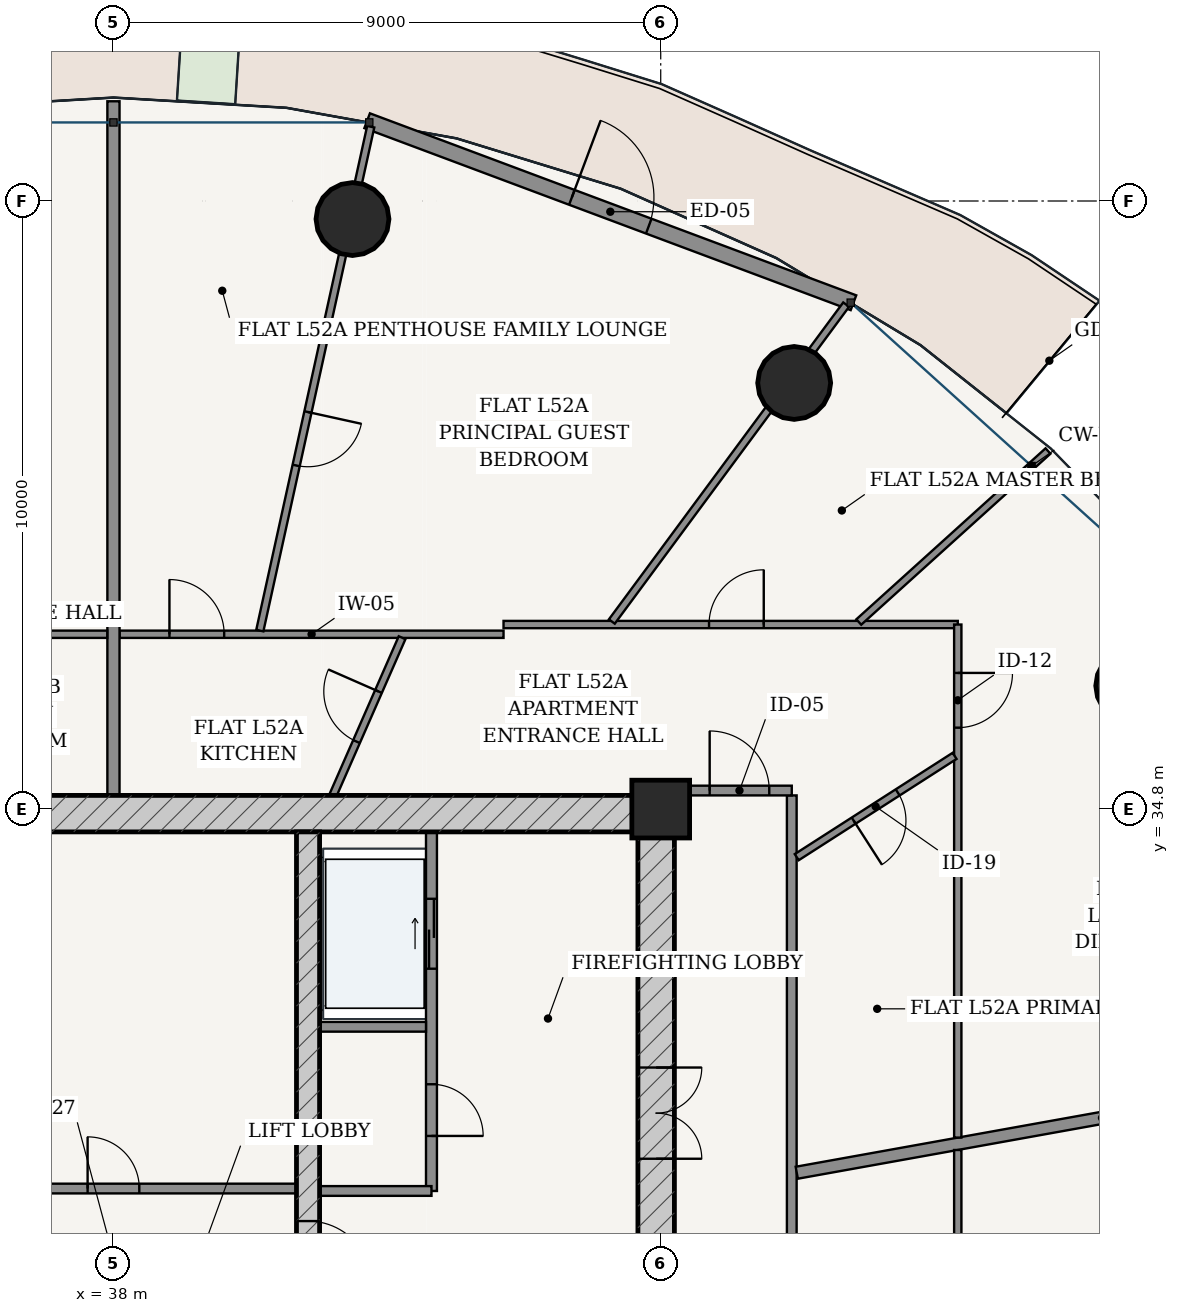
"""IFC4 building model, lengths in metres.
Left out: names, types, materials, properties, quantities, classifications, styles, units other than length and angle.
Written with IfcOpenShell. Run it as: python <this file> out.ifc"""

import sys

from ifc_helpers import new_model, si_unit, direction, frame, frame_2d, origin, origin_2d, place, context, subcontext, project, spatial, rectangle, hollow_circle, extrude, source, transform, mapped, element, fill, save


model = new_model("IFC4")
c1 = context("Model", 3, precision=1e-05, world=origin(), true_north=direction((-0.2419218956, 0.970295726276)))
c2 = subcontext(c1, "Body", "Model", "MODEL_VIEW")
j1 = project(units=[si_unit("LENGTHUNIT", "METRE"), si_unit("PLANEANGLEUNIT", "RADIAN")], contexts=[c1])
p1 = place(None, origin())
s1 = spatial("IfcSite", under=j1, at=p1, CompositionType="ELEMENT")
p2 = place(p1, origin())
s2 = spatial("IfcBuilding", under=s1, at=p2, CompositionType="ELEMENT")
p3 = place(p2, frame((0.0, 0.0, 198.6)))
s3 = spatial("IfcBuildingStorey", under=s2, at=p3, CompositionType="ELEMENT", Elevation=198.6)
p4 = place(p3, frame((47.0, 34.8, 0.0), z_axis=(0.0, 0.0, 1.0), x_axis=(1.0, 0.0, 0.0)))
e1 = element("IfcColumn", 1, at=p4, inside=s3, PredefinedType="COLUMN", context=c2, shape_type="SweptSolid", body=[
    extrude(rectangle(XDim=0.95, YDim=0.95, at=origin_2d()), origin(), (0.0, 0.0, 1.0), 3.7),
])
p5 = place(p3, frame((28.775, 34.725, 0.0), z_axis=(0.0, 0.0, 1.0), x_axis=(1.0, 0.0, 0.0)))
e2 = element("IfcWall", 2, at=p5, inside=s3, PredefinedType="SHEAR", context=c2, shape_type="SweptSolid", body=[
    extrude(rectangle(XDim=18.45, YDim=0.6, at=frame_2d((9.225, 0.0))), origin(), (0.0, 0.0, 1.0), 3.435),
])
p6 = place(p3, frame((46.925, 19.175, 0.0), z_axis=(0.0, 0.0, 1.0), x_axis=(0.0, 1.0, 0.0)))
e3 = element("IfcWall", 3, at=p6, inside=s3, PredefinedType="SHEAR", context=c2, shape_type="SweptSolid", body=[
    extrude(rectangle(XDim=15.25, YDim=0.6, at=frame_2d((7.625, 0.0))), origin(), (0.0, 0.0, 1.0), 3.435),
])
p7 = place(p6, frame((9.875, 0.0, 0.0)))
e4 = element("IfcOpeningElement", 4, at=p7, cuts=e3, PredefinedType="OPENING", context=c2, shape_type="SweptSolid", body=[
    extrude(rectangle(XDim=1.5, YDim=2.2, at=frame_2d((0.75, 1.1))), frame((0.0, 0.31, 0.0), z_axis=(0.0, -1.0, 0.0), x_axis=(1.0, 0.0, 0.0)), (0.0, 0.0, 1.0), 0.62),
])
p8 = place(p3, frame((41.2, 19.175, 0.0), z_axis=(0.0, 0.0, 1.0), x_axis=(0.0, 1.0, 0.0)))
e5 = element("IfcWall", 5, at=p8, inside=s3, PredefinedType="SHEAR", context=c2, shape_type="SweptSolid", body=[
    extrude(rectangle(XDim=15.25, YDim=0.38, at=frame_2d((7.625, 0.0))), origin(), (0.0, 0.0, 1.0), 3.435),
])
p9 = place(p8, frame((7.8, 0.0, 0.0)))
e6 = element("IfcOpeningElement", 6, at=p9, cuts=e5, PredefinedType="OPENING", context=c2, shape_type="SweptSolid", body=[
    extrude(rectangle(XDim=1.05, YDim=2.15, at=frame_2d((0.525, 1.075))), frame((0.0, 0.2, 0.0), z_axis=(0.0, -1.0, 0.0), x_axis=(1.0, 0.0, 0.0)), (0.0, 0.0, 1.0), 0.4),
])
for number, where, z_axis, x_axis in (
    (7, (54.754, 36.828, 0.0), (0.0, 0.0, 1.0), (1.0, 0.0, 0.0)),
    (8, (49.195, 41.808, 0.0), (0.0, 0.0, 1.0), (1.0, 0.0, 0.0)),
    (9, (41.931, 44.503, 0.0), (0.0, 0.0, 1.0), (1.0, 0.0, 0.0)),
):
    element("IfcColumn", number, at=place(p3, frame(where, z_axis=z_axis, x_axis=x_axis)), inside=s3, PredefinedType="COLUMN", context=c2, shape_type="SweptSolid", body=[
        extrude(hollow_circle(Radius=0.6, WallThickness=0.038, at=origin_2d()), origin(), (0.0, 0.0, 1.0), 3.7),
    ])
p10 = place(p3, frame((50.17, 43.127, 0.0), z_axis=(0.0, 0.0, 1.0), x_axis=(-0.936556918375, 0.350515532672, 0.0)))
e10 = element("IfcWall", 10, at=p10, inside=s3, PredefinedType="SOLIDWALL", context=c2, shape_type="SweptSolid", body=[
    extrude(rectangle(XDim=8.539, YDim=0.26, at=frame_2d((4.27, 0.0))), origin(), (0.0, 0.0, 1.0), 3.435),
])
p11 = place(p10, frame((3.594, 0.0, 0.0)))
e11 = element("IfcOpeningElement", 11, at=p11, cuts=e10, PredefinedType="OPENING", context=c2, shape_type="SweptSolid", body=[
    extrude(rectangle(XDim=1.35, YDim=2.2, at=frame_2d((0.675, 1.1))), frame((0.0, 0.14, 0.0), z_axis=(0.0, -1.0, 0.0), x_axis=(1.0, 0.0, 0.0)), (0.0, 0.0, 1.0), 0.28),
])
p12 = place(p3, frame((43.23, 28.52, 0.0), z_axis=(0.0, 0.0, 1.0), x_axis=(0.0, 1.0, 0.0)))
e12 = element("IfcWall", 12, at=p12, inside=s3, PredefinedType="PARTITIONING", context=c2, shape_type="SweptSolid", body=[
    extrude(rectangle(XDim=5.905, YDim=0.18, at=frame_2d((2.953, 0.0))), origin(), (0.0, 0.0, 1.0), 3.435),
])
p13 = place(p12, frame((0.905, 0.0, 0.0)))
e13 = element("IfcOpeningElement", 13, at=p13, cuts=e12, PredefinedType="OPENING", context=c2, shape_type="SweptSolid", body=[
    extrude(rectangle(XDim=0.85, YDim=2.1, at=frame_2d((0.425, 1.05))), frame((0.0, 0.1, 0.0), z_axis=(0.0, -1.0, 0.0), x_axis=(1.0, 0.0, 0.0)), (0.0, 0.0, 1.0), 0.2),
])
p14 = place(p12, frame((3.655, 0.0, 0.0)))
e14 = element("IfcOpeningElement", 14, at=p14, cuts=e12, PredefinedType="OPENING", context=c2, shape_type="SweptSolid", body=[
    extrude(rectangle(XDim=1.15, YDim=2.2, at=frame_2d((0.575, 1.1))), frame((0.0, 0.1, 0.0), z_axis=(0.0, -1.0, 0.0), x_axis=(1.0, 0.0, 0.0)), (0.0, 0.0, 1.0), 0.2),
])
p15 = place(p3, frame((41.39, 31.22, 0.0), z_axis=(0.0, 0.0, 1.0), x_axis=(1.0, 0.0, 0.0)))
e15 = element("IfcWall", 15, at=p15, inside=s3, PredefinedType="PARTITIONING", context=c2, shape_type="SweptSolid", body=[
    extrude(rectangle(XDim=1.75, YDim=0.16, at=frame_2d((0.875, 0.0))), origin(), (0.0, 0.0, 1.0), 3.435),
])
p16 = place(p3, frame((41.39, 28.52, 0.0), z_axis=(0.0, 0.0, 1.0), x_axis=(1.0, 0.0, 0.0)))
e16 = element("IfcWall", 16, at=p16, inside=s3, PredefinedType="PARTITIONING", context=c2, shape_type="SweptSolid", body=[
    extrude(rectangle(XDim=1.84, YDim=0.16, at=frame_2d((0.92, 0.0))), origin(), (0.0, 0.0, 1.0), 3.435),
])
p17 = place(p3, frame((34.99, 28.56, 0.0), z_axis=(0.0, 0.0, 1.0), x_axis=(1.0, 0.0, 0.0)))
e17 = element("IfcWall", 17, at=p17, inside=s3, PredefinedType="PARTITIONING", context=c2, shape_type="SweptSolid", body=[
    extrude(rectangle(XDim=6.02, YDim=0.16, at=frame_2d((3.01, 0.0))), origin(), (0.0, 0.0, 1.0), 3.435),
])
p18 = place(p17, frame((2.585, 0.0, 0.0)))
e18 = element("IfcOpeningElement", 18, at=p18, cuts=e17, PredefinedType="OPENING", context=c2, shape_type="SweptSolid", body=[
    extrude(rectangle(XDim=0.85, YDim=2.1, at=frame_2d((0.425, 1.05))), frame((0.0, 0.09, 0.0), z_axis=(0.0, -1.0, 0.0), x_axis=(1.0, 0.0, 0.0)), (0.0, 0.0, 1.0), 0.18),
])
p19 = place(p3, frame((49.155, 16.725, 0.0), z_axis=(0.0, 0.0, 1.0), x_axis=(0.0, 1.0, 0.0)))
e19 = element("IfcWall", 19, at=p19, inside=s3, PredefinedType="PARTITIONING", context=c2, shape_type="SweptSolid", body=[
    extrude(rectangle(XDim=18.3, YDim=0.16, at=frame_2d((9.15, 0.0))), origin(), (0.0, 0.0, 1.0), 2.951),
])
p20 = place(p3, frame((47.225, 35.105, 0.0), z_axis=(0.0, 0.0, 1.0), x_axis=(1.0, 0.0, 0.0)))
e20 = element("IfcWall", 20, at=p20, inside=s3, PredefinedType="PARTITIONING", context=c2, shape_type="SweptSolid", body=[
    extrude(rectangle(XDim=1.93, YDim=0.16, at=frame_2d((0.965, 0.0))), origin(), (0.0, 0.0, 1.0), 3.435),
])
p21 = place(p20, frame((0.58, 0.0, 0.0)))
e21 = element("IfcOpeningElement", 21, at=p21, cuts=e20, PredefinedType="OPENING", context=c2, shape_type="SweptSolid", body=[
    extrude(rectangle(XDim=0.98, YDim=2.2, at=frame_2d((0.49, 1.1))), frame((0.0, 0.09, 0.0), z_axis=(0.0, -1.0, 0.0), x_axis=(1.0, 0.0, 0.0)), (0.0, 0.0, 1.0), 0.18),
])
p22 = place(p3, frame((49.237, 28.82, 0.0), z_axis=(0.0, 0.0, 1.0), x_axis=(0.984224859606, 0.176922089446, 0.0)))
e22 = element("IfcWall", 22, at=p22, inside=s3, PredefinedType="PARTITIONING", context=c2, shape_type="SweptSolid", body=[
    extrude(rectangle(XDim=10.2, YDim=0.2, at=frame_2d((5.1, 0.0))), origin(), (0.0, 0.0, 1.0), 2.951),
])
p23 = place(p3, frame((38.102, 37.675, 0.0), z_axis=(0.0, 0.0, 1.0), x_axis=(1.0, 0.0, 0.0)))
e23 = element("IfcWall", 23, at=p23, inside=s3, PredefinedType="PARTITIONING", context=c2, shape_type="SweptSolid", body=[
    extrude(rectangle(XDim=6.313, YDim=0.12, at=frame_2d((3.156, 0.0))), origin(), (0.0, 0.0, 1.0), 2.951),
])
p24 = place(p23, frame((0.819, 0.0, 0.0)))
e24 = element("IfcOpeningElement", 24, at=p24, cuts=e23, PredefinedType="OPENING", context=c2, shape_type="SweptSolid", body=[
    extrude(rectangle(XDim=0.9, YDim=2.15, at=frame_2d((0.45, 1.075))), frame((0.0, 0.07, 0.0), z_axis=(0.0, -1.0, 0.0), x_axis=(1.0, 0.0, 0.0)), (0.0, 0.0, 1.0), 0.14),
])
p25 = place(p3, frame((44.415, 37.835, 0.0), z_axis=(0.0, 0.0, 1.0), x_axis=(1.0, 0.0, 0.0)))
e25 = element("IfcWall", 25, at=p25, inside=s3, PredefinedType="PARTITIONING", context=c2, shape_type="SweptSolid", body=[
    extrude(rectangle(XDim=7.47, YDim=0.12, at=frame_2d((3.735, 0.0))), origin(), (0.0, 0.0, 1.0), 2.951),
])
p26 = place(p25, frame((3.379, 0.0, 0.0)))
e26 = element("IfcOpeningElement", 26, at=p26, cuts=e25, PredefinedType="OPENING", context=c2, shape_type="SweptSolid", body=[
    extrude(rectangle(XDim=0.9, YDim=2.15, at=frame_2d((0.45, 1.075))), frame((0.0, 0.07, 0.0), z_axis=(0.0, -1.0, 0.0), x_axis=(1.0, 0.0, 0.0)), (0.0, 0.0, 1.0), 0.14),
])
p27 = place(p3, frame((51.885, 37.835, 0.0), z_axis=(0.0, 0.0, 1.0), x_axis=(0.0, -1.0, 0.0)))
e27 = element("IfcWall", 27, at=p27, inside=s3, PredefinedType="PARTITIONING", context=c2, shape_type="SweptSolid", body=[
    extrude(rectangle(XDim=8.437, YDim=0.12, at=frame_2d((4.219, 0.0))), origin(), (0.0, 0.0, 1.0), 2.951),
])
p28 = place(p27, frame((0.796, 0.0, 0.0)))
e28 = element("IfcOpeningElement", 28, at=p28, cuts=e27, PredefinedType="OPENING", context=c2, shape_type="SweptSolid", body=[
    extrude(rectangle(XDim=0.9, YDim=2.15, at=frame_2d((0.45, 1.075))), frame((0.0, 0.07, 0.0), z_axis=(0.0, -1.0, 0.0), x_axis=(1.0, 0.0, 0.0)), (0.0, 0.0, 1.0), 0.14),
])
p29 = place(p3, frame((50.257, 37.876, 0.0), z_axis=(0.0, 0.0, 1.0), x_axis=(0.741943837234, 0.670462036502, 0.0)))
e29 = element("IfcWall", 29, at=p29, inside=s3, PredefinedType="PARTITIONING", context=c2, shape_type="SweptSolid", body=[
    extrude(rectangle(XDim=4.194, YDim=0.12, at=frame_2d((2.097, 0.0))), origin(), (0.0, 0.0, 1.0), 2.951),
])
p30 = place(p3, frame((46.196, 37.885, 0.0), z_axis=(0.0, 0.0, 1.0), x_axis=(0.594507557292, 0.804090022524, 0.0)))
e30 = element("IfcWall", 30, at=p30, inside=s3, PredefinedType="PARTITIONING", context=c2, shape_type="SweptSolid", body=[
    extrude(rectangle(XDim=6.481, YDim=0.12, at=frame_2d((3.241, 0.0))), origin(), (0.0, 0.0, 1.0), 2.951),
])
p31 = place(p3, frame((40.407, 37.736, 0.0), z_axis=(0.0, 0.0, 1.0), x_axis=(0.214971015179, 0.97662042915, 0.0)))
e31 = element("IfcWall", 31, at=p31, inside=s3, PredefinedType="PARTITIONING", context=c2, shape_type="SweptSolid", body=[
    extrude(rectangle(XDim=8.485, YDim=0.12, at=frame_2d((4.242, 0.0))), origin(), (0.0, 0.0, 1.0), 2.951),
])
p32 = place(p31, frame((2.78, 0.0, 0.0)))
e32 = element("IfcOpeningElement", 32, at=p32, cuts=e31, PredefinedType="OPENING", context=c2, shape_type="SweptSolid", body=[
    extrude(rectangle(XDim=0.9, YDim=2.15, at=frame_2d((0.45, 1.075))), frame((0.0, 0.07, 0.0), z_axis=(0.0, -1.0, 0.0), x_axis=(1.0, 0.0, 0.0)), (0.0, 0.0, 1.0), 0.14),
])
p33 = place(p3, frame((49.237, 34.009, 0.0), z_axis=(0.0, 0.0, 1.0), x_axis=(0.841651322174, 0.540021343915, 0.0)))
e33 = element("IfcWall", 33, at=p33, inside=s3, PredefinedType="PARTITIONING", context=c2, shape_type="SweptSolid", body=[
    extrude(rectangle(XDim=3.085, YDim=0.12, at=frame_2d((1.542, 0.0))), origin(), (0.0, 0.0, 1.0), 3.11),
])
p34 = place(p33, frame((1.112, 0.0, 0.0)))
e34 = element("IfcOpeningElement", 34, at=p34, cuts=e33, PredefinedType="OPENING", context=c2, shape_type="SweptSolid", body=[
    extrude(rectangle(XDim=0.86, YDim=2.15, at=frame_2d((0.43, 1.075))), frame((0.0, 0.07, 0.0), z_axis=(0.0, -1.0, 0.0), x_axis=(1.0, 0.0, 0.0)), (0.0, 0.0, 1.0), 0.14),
])
p35 = place(p3, frame((41.61, 35.027, 0.0), z_axis=(0.0, 0.0, 1.0), x_axis=(0.401859508224, 0.915701335398, 0.0)))
e35 = element("IfcWall", 35, at=p35, inside=s3, PredefinedType="PARTITIONING", context=c2, shape_type="SweptSolid", body=[
    extrude(rectangle(XDim=2.83, YDim=0.12, at=frame_2d((1.415, 0.0))), origin(), (0.0, 0.0, 1.0), 3.435),
])
p36 = place(p35, frame((0.965, 0.0, 0.0)))
e36 = element("IfcOpeningElement", 36, at=p36, cuts=e35, PredefinedType="OPENING", context=c2, shape_type="SweptSolid", body=[
    extrude(rectangle(XDim=0.9, YDim=2.15, at=frame_2d((0.45, 1.075))), frame((0.0, 0.07, 0.0), z_axis=(0.0, -1.0, 0.0), x_axis=(1.0, 0.0, 0.0)), (0.0, 0.0, 1.0), 0.14),
])
p37 = place(p3, frame((38.0, 35.027, 0.0), z_axis=(0.0, 0.0, 1.0), x_axis=(0.0, 1.0, 0.0)))
e37 = element("IfcWall", 37, at=p37, inside=s3, PredefinedType="PARTITIONING", context=c2, shape_type="SweptSolid", body=[
    extrude(rectangle(XDim=11.413, YDim=0.2, at=frame_2d((5.707, 0.0))), origin(), (0.0, 0.0, 1.0), 2.52),
])
p38 = place(p3, frame((31.585, 37.675, 0.0), z_axis=(0.0, 0.0, 1.0), x_axis=(1.0, 0.0, 0.0)))
e38 = element("IfcWall", 38, at=p38, inside=s3, PredefinedType="PARTITIONING", context=c2, shape_type="SweptSolid", body=[
    extrude(rectangle(XDim=6.313, YDim=0.12, at=frame_2d((3.156, 0.0))), origin(), (0.0, 0.0, 1.0), 2.951),
])
p39 = place(p3, frame((51.885, 29.194, 0.0), z_axis=(0.0, 0.0, 1.0), x_axis=(0.0, -1.0, 0.0)))
e39 = element("IfcWall", 39, at=p39, inside=s3, PredefinedType="PARTITIONING", context=c2, shape_type="SweptSolid", body=[
    extrude(rectangle(XDim=15.279, YDim=0.12, at=frame_2d((7.639, 0.0))), origin(), (0.0, 0.0, 1.0), 2.951),
])
p40 = place(p39, frame((7.873, 0.0, 0.0)))
e40 = element("IfcOpeningElement", 40, at=p40, cuts=e39, PredefinedType="OPENING", context=c2, shape_type="SweptSolid", body=[
    extrude(rectangle(XDim=0.9, YDim=2.15, at=frame_2d((0.45, 1.075))), frame((0.0, 0.07, 0.0), z_axis=(0.0, -1.0, 0.0), x_axis=(1.0, 0.0, 0.0)), (0.0, 0.0, 1.0), 0.14),
])
m1 = source(origin(), c2, "Body", "SweptSolid", [
    extrude(rectangle(XDim=1.35, YDim=2.2, at=frame_2d((0.675, 1.1))), frame((0.0, 0.025, 0.0), z_axis=(0.0, -1.0, 0.0), x_axis=(1.0, 0.0, 0.0)), (0.0, 0.0, 1.0), 0.05),
])
p41 = place(p11, frame((1.35, 0.0, 0.0), z_axis=(0.0, 0.0, 1.0), x_axis=(-1.0, 0.0, 0.0)))
e41 = element("IfcDoor", 41, at=p41, inside=s3, OperationType="SINGLE_SWING_LEFT", PredefinedType="DOOR", context=c2, shape_type="MappedRepresentation", body=[
    mapped(m1, transform((0.0, 0.0, 0.0), scale=1.0)),
])
fill(e11, e41)
m2 = source(origin(), c2, "Body", "SweptSolid", [
    extrude(rectangle(XDim=1.5, YDim=2.2, at=frame_2d((0.75, 1.1))), frame((0.0, 0.025, 0.0), z_axis=(0.0, -1.0, 0.0), x_axis=(1.0, 0.0, 0.0)), (0.0, 0.0, 1.0), 0.05),
])
p42 = place(p7, frame((1.5, 0.0, 0.0), z_axis=(0.0, 0.0, 1.0), x_axis=(-1.0, 0.0, 0.0)))
e42 = element("IfcDoor", 42, at=p42, inside=s3, OperationType="DOUBLE_DOOR_SINGLE_SWING", PredefinedType="DOOR", context=c2, shape_type="MappedRepresentation", body=[
    mapped(m2, transform((0.0, 0.0, 0.0), scale=1.0)),
])
fill(e4, e42)
m3 = source(origin(), c2, "Body", "SweptSolid", [
    extrude(rectangle(XDim=1.05, YDim=2.15, at=frame_2d((0.525, 1.075))), frame((0.0, 0.025, 0.0), z_axis=(0.0, -1.0, 0.0), x_axis=(1.0, 0.0, 0.0)), (0.0, 0.0, 1.0), 0.05),
])
p43 = place(p9, frame((1.05, 0.0, 0.0), z_axis=(0.0, 0.0, 1.0), x_axis=(-1.0, 0.0, 0.0)))
e43 = element("IfcDoor", 43, at=p43, inside=s3, OperationType="SINGLE_SWING_RIGHT", PredefinedType="DOOR", context=c2, shape_type="MappedRepresentation", body=[
    mapped(m3, transform((0.0, 0.0, 0.0), scale=1.0)),
])
fill(e6, e43)
m4 = source(origin(), c2, "Body", "SweptSolid", [
    extrude(rectangle(XDim=0.85, YDim=2.1, at=frame_2d((0.425, 1.05))), frame((0.0, 0.025, 0.0), z_axis=(0.0, -1.0, 0.0), x_axis=(1.0, 0.0, 0.0)), (0.0, 0.0, 1.0), 0.05),
])
p44 = place(p13, frame((0.85, 0.0, 0.0), z_axis=(0.0, 0.0, 1.0), x_axis=(-1.0, 0.0, 0.0)))
e44 = element("IfcDoor", 44, at=p44, inside=s3, OperationType="SINGLE_SWING_RIGHT", PredefinedType="DOOR", context=c2, shape_type="MappedRepresentation", body=[
    mapped(m4, transform((0.0, 0.0, 0.0), scale=1.0)),
])
fill(e13, e44)
p45 = place(p18, origin())
e45 = element("IfcDoor", 45, at=p45, inside=s3, OperationType="SINGLE_SWING_LEFT", PredefinedType="DOOR", context=c2, shape_type="MappedRepresentation", body=[
    mapped(m4, transform((0.0, 0.0, 0.0), scale=1.0)),
])
fill(e18, e45)
m5 = source(origin(), c2, "Body", "SweptSolid", [
    extrude(rectangle(XDim=1.15, YDim=2.2, at=frame_2d((0.575, 1.1))), frame((0.0, 0.025, 0.0), z_axis=(0.0, -1.0, 0.0), x_axis=(1.0, 0.0, 0.0)), (0.0, 0.0, 1.0), 0.05),
])
p46 = place(p14, origin())
e46 = element("IfcDoor", 46, at=p46, inside=s3, OperationType="DOUBLE_DOOR_SLIDING", PredefinedType="DOOR", context=c2, shape_type="MappedRepresentation", body=[
    mapped(m5, transform((0.0, 0.0, 0.0), scale=1.0)),
])
fill(e14, e46)
m6 = source(origin(), c2, "Body", "SweptSolid", [
    extrude(rectangle(XDim=0.98, YDim=2.2, at=frame_2d((0.49, 1.1))), frame((0.0, 0.025, 0.0), z_axis=(0.0, -1.0, 0.0), x_axis=(1.0, 0.0, 0.0)), (0.0, 0.0, 1.0), 0.05),
])
p47 = place(p21, origin())
e47 = element("IfcDoor", 47, at=p47, inside=s3, OperationType="SINGLE_SWING_LEFT", PredefinedType="DOOR", context=c2, shape_type="MappedRepresentation", body=[
    mapped(m6, transform((0.0, 0.0, 0.0), scale=1.0)),
])
fill(e21, e47)
m7 = source(origin(), c2, "Body", "SweptSolid", [
    extrude(rectangle(XDim=0.86, YDim=2.15, at=frame_2d((0.43, 1.075))), frame((0.0, 0.025, 0.0), z_axis=(0.0, -1.0, 0.0), x_axis=(1.0, 0.0, 0.0)), (0.0, 0.0, 1.0), 0.05),
])
p48 = place(p34, frame((0.86, 0.0, 0.0), z_axis=(0.0, 0.0, 1.0), x_axis=(-1.0, 0.0, 0.0)))
e48 = element("IfcDoor", 48, at=p48, inside=s3, OperationType="SINGLE_SWING_RIGHT", PredefinedType="DOOR", context=c2, shape_type="MappedRepresentation", body=[
    mapped(m7, transform((0.0, 0.0, 0.0), scale=1.0)),
])
fill(e34, e48)
m8 = source(origin(), c2, "Body", "SweptSolid", [
    extrude(rectangle(XDim=0.9, YDim=2.15, at=frame_2d((0.45, 1.075))), frame((0.0, 0.025, 0.0), z_axis=(0.0, -1.0, 0.0), x_axis=(1.0, 0.0, 0.0)), (0.0, 0.0, 1.0), 0.05),
])
p49 = place(p28, origin())
e49 = element("IfcDoor", 49, at=p49, inside=s3, OperationType="SINGLE_SWING_LEFT", PredefinedType="DOOR", context=c2, shape_type="MappedRepresentation", body=[
    mapped(m8, transform((0.0, 0.0, 0.0), scale=1.0)),
])
fill(e28, e49)
p50 = place(p36, origin())
e50 = element("IfcDoor", 50, at=p50, inside=s3, OperationType="SINGLE_SWING_RIGHT", PredefinedType="DOOR", context=c2, shape_type="MappedRepresentation", body=[
    mapped(m8, transform((0.0, 0.0, 0.0), scale=1.0)),
])
fill(e36, e50)
p51 = place(p24, origin())
e51 = element("IfcDoor", 51, at=p51, inside=s3, OperationType="SINGLE_SWING_LEFT", PredefinedType="DOOR", context=c2, shape_type="MappedRepresentation", body=[
    mapped(m8, transform((0.0, 0.0, 0.0), scale=1.0)),
])
fill(e24, e51)
p52 = place(p26, origin())
e52 = element("IfcDoor", 52, at=p52, inside=s3, OperationType="SINGLE_SWING_RIGHT", PredefinedType="DOOR", context=c2, shape_type="MappedRepresentation", body=[
    mapped(m8, transform((0.0, 0.0, 0.0), scale=1.0)),
])
fill(e26, e52)
p53 = place(p32, frame((0.9, 0.0, 0.0), z_axis=(0.0, 0.0, 1.0), x_axis=(-1.0, 0.0, 0.0)))
e53 = element("IfcDoor", 53, at=p53, inside=s3, OperationType="SINGLE_SWING_LEFT", PredefinedType="DOOR", context=c2, shape_type="MappedRepresentation", body=[
    mapped(m8, transform((0.0, 0.0, 0.0), scale=1.0)),
])
fill(e32, e53)
save(model, sys.argv[1])
